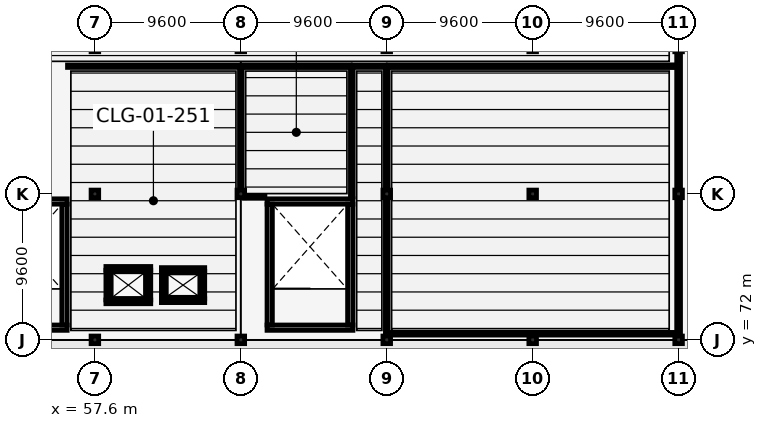
"""IFC4 building model, lengths in metres.
Left out: names, types, materials, properties, quantities, classifications, styles, units other than length and angle.
Written with IfcOpenShell. Run it as: python <this file> out.ifc"""

import sys

from ifc_helpers import new_model, si_unit, direction, frame, frame_2d, origin, origin_2d, place, context, subcontext, project, spatial, rectangle, extrude, element, fill, save


model = new_model("IFC4")
c1 = context("Model", 3, precision=1e-05, world=origin(), true_north=direction((0.0, 1.0)))
c2 = subcontext(c1, "Body", "Model", "MODEL_VIEW")
j1 = project(units=[si_unit("LENGTHUNIT", "METRE"), si_unit("PLANEANGLEUNIT", "RADIAN")], contexts=[c1])
p1 = place(None, origin())
s1 = spatial("IfcSite", under=j1, at=p1, CompositionType="ELEMENT")
p2 = place(p1, origin())
s2 = spatial("IfcBuilding", under=s1, at=p2, CompositionType="ELEMENT")
p3 = place(p2, frame((0.0, 0.0, 14.1)))
s3 = spatial("IfcBuildingStorey", under=s2, at=p3, CompositionType="ELEMENT", Elevation=14.1)
p4 = place(p3, frame((57.6, 72.0, 0.0), z_axis=(0.0, 0.0, 1.0), x_axis=(1.0, 0.0, 0.0)))
e1 = element("IfcColumn", 1, at=p4, inside=s3, PredefinedType="COLUMN", context=c2, shape_type="SweptSolid", body=[
    extrude(rectangle(XDim=0.5, YDim=0.5, at=origin_2d()), origin(), (0.0, 0.0, 1.0), 3.705),
])
p5 = place(p3, frame((57.6, 81.6, 0.0), z_axis=(0.0, 0.0, 1.0), x_axis=(1.0, 0.0, 0.0)))
e2 = element("IfcColumn", 2, at=p5, inside=s3, PredefinedType="COLUMN", context=c2, shape_type="SweptSolid", body=[
    extrude(rectangle(XDim=0.5, YDim=0.5, at=origin_2d()), origin(), (0.0, 0.0, 1.0), 4.485),
])
p6 = place(p3, frame((67.2, 72.0, 0.0), z_axis=(0.0, 0.0, 1.0), x_axis=(1.0, 0.0, 0.0)))
e3 = element("IfcColumn", 3, at=p6, inside=s3, PredefinedType="COLUMN", context=c2, shape_type="SweptSolid", body=[
    extrude(rectangle(XDim=0.5, YDim=0.5, at=origin_2d()), origin(), (0.0, 0.0, 1.0), 3.861),
])
p7 = place(p3, frame((67.2, 81.6, 0.0), z_axis=(0.0, 0.0, 1.0), x_axis=(1.0, 0.0, 0.0)))
e4 = element("IfcColumn", 4, at=p7, inside=s3, PredefinedType="COLUMN", context=c2, shape_type="SweptSolid", body=[
    extrude(rectangle(XDim=0.5, YDim=0.5, at=origin_2d()), origin(), (0.0, 0.0, 1.0), 4.5),
])
p8 = place(p3, frame((76.8, 72.0, 0.0), z_axis=(0.0, 0.0, 1.0), x_axis=(1.0, 0.0, 0.0)))
e5 = element("IfcColumn", 5, at=p8, inside=s3, PredefinedType="COLUMN", context=c2, shape_type="SweptSolid", body=[
    extrude(rectangle(XDim=0.5, YDim=0.5, at=origin_2d()), origin(), (0.0, 0.0, 1.0), 3.851),
])
p9 = place(p3, frame((76.8, 81.6, 0.0), z_axis=(0.0, 0.0, 1.0), x_axis=(1.0, 0.0, 0.0)))
e6 = element("IfcColumn", 6, at=p9, inside=s3, PredefinedType="COLUMN", context=c2, shape_type="SweptSolid", body=[
    extrude(rectangle(XDim=0.5, YDim=0.5, at=origin_2d()), origin(), (0.0, 0.0, 1.0), 4.5),
])
p10 = place(p3, frame((86.4, 72.0, 0.0), z_axis=(0.0, 0.0, 1.0), x_axis=(1.0, 0.0, 0.0)))
e7 = element("IfcColumn", 7, at=p10, inside=s3, PredefinedType="COLUMN", context=c2, shape_type="SweptSolid", body=[
    extrude(rectangle(XDim=0.5, YDim=0.5, at=origin_2d()), origin(), (0.0, 0.0, 1.0), 3.675),
])
p11 = place(p3, frame((86.4, 81.6, 0.0), z_axis=(0.0, 0.0, 1.0), x_axis=(1.0, 0.0, 0.0)))
e8 = element("IfcColumn", 8, at=p11, inside=s3, PredefinedType="COLUMN", context=c2, shape_type="SweptSolid", body=[
    extrude(rectangle(XDim=0.5, YDim=0.5, at=origin_2d()), origin(), (0.0, 0.0, 1.0), 4.402),
])
p12 = place(p3, frame((96.0, 72.0, 0.0), z_axis=(0.0, 0.0, 1.0), x_axis=(1.0, 0.0, 0.0)))
e9 = element("IfcColumn", 9, at=p12, inside=s3, PredefinedType="COLUMN", context=c2, shape_type="SweptSolid", body=[
    extrude(rectangle(XDim=0.5, YDim=0.5, at=origin_2d()), origin(), (0.0, 0.0, 1.0), 3.385),
])
p13 = place(p3, frame((96.0, 81.6, 0.0), z_axis=(0.0, 0.0, 1.0), x_axis=(1.0, 0.0, 0.0)))
e10 = element("IfcColumn", 10, at=p13, inside=s3, PredefinedType="COLUMN", context=c2, shape_type="SweptSolid", body=[
    extrude(rectangle(XDim=0.5, YDim=0.5, at=origin_2d()), origin(), (0.0, 0.0, 1.0), 3.592),
])
p14 = place(p3, frame((96.0, 72.25, 0.0), z_axis=(0.0, 0.0, 1.0), x_axis=(0.0, 1.0, 0.0)))
e11 = element("IfcWall", 11, at=p14, inside=s3, PredefinedType="STANDARD", context=c2, shape_type="SweptSolid", body=[
    extrude(rectangle(XDim=9.1, YDim=0.25, at=frame_2d((4.55, 0.0))), origin(), (0.0, 0.0, 1.0), 2.526),
])
p15 = place(p14, frame((3.2, 0.0, 0.0)))
e12 = element("IfcOpeningElement", 12, at=p15, cuts=e11, PredefinedType="OPENING", context=c2, shape_type="SweptSolid", body=[
    extrude(rectangle(XDim=1.6, YDim=2.2, at=frame_2d((0.8, 1.1))), frame((0.0, 0.135, 0.0), z_axis=(0.0, -1.0, 0.0), x_axis=(1.0, 0.0, 0.0)), (0.0, 0.0, 1.0), 0.27),
])
p16 = place(p3, frame((96.0, 81.85, 0.0), z_axis=(0.0, 0.0, 1.0), x_axis=(0.0, 1.0, 0.0)))
e13 = element("IfcWall", 13, at=p16, inside=s3, PredefinedType="STANDARD", context=c2, shape_type="SweptSolid", body=[
    extrude(rectangle(XDim=9.1, YDim=0.25, at=frame_2d((4.55, 0.0))), origin(), (0.0, 0.0, 1.0), 2.733),
])
p17 = place(p16, frame((3.0, 0.0, 1.0)))
e14 = element("IfcOpeningElement", 14, at=p17, cuts=e13, PredefinedType="OPENING", context=c2, shape_type="SweptSolid", body=[
    extrude(rectangle(XDim=1.16, YDim=1.47, at=frame_2d((0.58, 0.735))), frame((0.0, 0.135, 0.0), z_axis=(0.0, -1.0, 0.0), x_axis=(1.0, 0.0, 0.0)), (0.0, 0.0, 1.0), 0.27),
])
for number, where, z_axis, x_axis in (
    (15, (55.775, 72.8, 0.0), (0.0, 0.0, 1.0), (-1.0, 0.0, 0.0)),
    (16, (50.125, 81.1, 0.0), (0.0, 0.0, 1.0), (1.0, 0.0, 0.0)),
):
    element("IfcWall", number, at=place(p3, frame(where, z_axis=z_axis, x_axis=x_axis)), inside=s3, PredefinedType="SHEAR", context=c2, shape_type="SweptSolid", body=[
        extrude(rectangle(XDim=5.65, YDim=0.35, at=frame_2d((2.825, 0.0))), origin(), (0.0, 0.0, 1.0), 3.65),
    ])
p18 = place(p3, frame((55.6, 80.925, 0.0), z_axis=(0.0, 0.0, 1.0), x_axis=(0.0, -1.0, 0.0)))
e17 = element("IfcWall", 17, at=p18, inside=s3, PredefinedType="SHEAR", context=c2, shape_type="SweptSolid", body=[
    extrude(rectangle(XDim=7.95, YDim=0.35, at=frame_2d((3.975, 0.0))), origin(), (0.0, 0.0, 1.0), 3.65),
])
p19 = place(p18, frame((5.68, 0.0, 0.0)))
e18 = element("IfcOpeningElement", 18, at=p19, cuts=e17, PredefinedType="OPENING", context=c2, shape_type="SweptSolid", body=[
    extrude(rectangle(XDim=2.05, YDim=2.15, at=frame_2d((1.025, 1.075))), frame((0.0, 0.185, 0.0), z_axis=(0.0, -1.0, 0.0), x_axis=(1.0, 0.0, 0.0)), (0.0, 0.0, 1.0), 0.37),
])
for number, where, z_axis, x_axis in (
    (19, (74.575, 72.8, 0.0), (0.0, 0.0, 1.0), (-1.0, 0.0, 0.0)),
    (20, (68.925, 81.1, 0.0), (0.0, 0.0, 1.0), (1.0, 0.0, 0.0)),
):
    element("IfcWall", number, at=place(p3, frame(where, z_axis=z_axis, x_axis=x_axis)), inside=s3, PredefinedType="SHEAR", context=c2, shape_type="SweptSolid", body=[
        extrude(rectangle(XDim=5.65, YDim=0.35, at=frame_2d((2.825, 0.0))), origin(), (0.0, 0.0, 1.0), 3.65),
    ])
p20 = place(p3, frame((69.1, 72.975, 0.0), z_axis=(0.0, 0.0, 1.0), x_axis=(0.0, 1.0, 0.0)))
e21 = element("IfcWall", 21, at=p20, inside=s3, PredefinedType="SHEAR", context=c2, shape_type="SweptSolid", body=[
    extrude(rectangle(XDim=7.95, YDim=0.35, at=frame_2d((3.975, 0.0))), origin(), (0.0, 0.0, 1.0), 3.65),
])
p21 = place(p3, frame((74.4, 80.925, 0.0), z_axis=(0.0, 0.0, 1.0), x_axis=(0.0, -1.0, 0.0)))
e22 = element("IfcWall", 22, at=p21, inside=s3, PredefinedType="SHEAR", context=c2, shape_type="SweptSolid", body=[
    extrude(rectangle(XDim=7.95, YDim=0.35, at=frame_2d((3.975, 0.0))), origin(), (0.0, 0.0, 1.0), 3.65),
])
p22 = place(p21, frame((5.68, 0.0, 0.0)))
e23 = element("IfcOpeningElement", 23, at=p22, cuts=e22, PredefinedType="OPENING", context=c2, shape_type="SweptSolid", body=[
    extrude(rectangle(XDim=2.05, YDim=2.15, at=frame_2d((1.025, 1.075))), frame((0.0, 0.185, 0.0), z_axis=(0.0, -1.0, 0.0), x_axis=(1.0, 0.0, 0.0)), (0.0, 0.0, 1.0), 0.37),
])
p23 = place(p3, frame((61.275, 74.5, 0.0), z_axis=(0.0, 0.0, 1.0), x_axis=(-1.0, 0.0, 0.0)))
e24 = element("IfcWall", 24, at=p23, inside=s3, PredefinedType="SOLIDWALL", context=c2, shape_type="SweptSolid", body=[
    extrude(rectangle(XDim=2.95, YDim=0.25, at=frame_2d((1.475, 0.0))), origin(), (0.0, 0.0, 1.0), 3.65),
])
p24 = place(p3, frame((58.325, 76.7, 0.0), z_axis=(0.0, 0.0, 1.0), x_axis=(1.0, 0.0, 0.0)))
e25 = element("IfcWall", 25, at=p24, inside=s3, PredefinedType="SOLIDWALL", context=c2, shape_type="SweptSolid", body=[
    extrude(rectangle(XDim=2.95, YDim=0.25, at=frame_2d((1.475, 0.0))), origin(), (0.0, 0.0, 1.0), 3.65),
])
p25 = place(p24, frame((0.925, 0.0, 0.0)))
e26 = element("IfcOpeningElement", 26, at=p25, cuts=e25, PredefinedType="OPENING", context=c2, shape_type="SweptSolid", body=[
    extrude(rectangle(XDim=1.1, YDim=2.15, at=frame_2d((0.55, 1.075))), frame((0.0, 0.135, 0.0), z_axis=(0.0, -1.0, 0.0), x_axis=(1.0, 0.0, 0.0)), (0.0, 0.0, 1.0), 0.27),
])
for number, where, z_axis, x_axis in (
    (27, (58.45, 74.625, 0.0), (0.0, 0.0, 1.0), (0.0, 1.0, 0.0)),
    (28, (61.15, 76.575, 0.0), (0.0, 0.0, 1.0), (0.0, -1.0, 0.0)),
):
    element("IfcWall", number, at=place(p3, frame(where, z_axis=z_axis, x_axis=x_axis)), inside=s3, PredefinedType="SOLIDWALL", context=c2, shape_type="SweptSolid", body=[
        extrude(rectangle(XDim=1.95, YDim=0.25, at=frame_2d((0.975, 0.0))), origin(), (0.0, 0.0, 1.0), 3.65),
    ])
p26 = place(p3, frame((64.825, 74.575, 0.0), z_axis=(0.0, 0.0, 1.0), x_axis=(-1.0, 0.0, 0.0)))
e29 = element("IfcWall", 29, at=p26, inside=s3, PredefinedType="SOLIDWALL", context=c2, shape_type="SweptSolid", body=[
    extrude(rectangle(XDim=2.85, YDim=0.25, at=frame_2d((1.425, 0.0))), origin(), (0.0, 0.0, 1.0), 3.65),
])
p27 = place(p3, frame((61.975, 76.625, 0.0), z_axis=(0.0, 0.0, 1.0), x_axis=(1.0, 0.0, 0.0)))
e30 = element("IfcWall", 30, at=p27, inside=s3, PredefinedType="SOLIDWALL", context=c2, shape_type="SweptSolid", body=[
    extrude(rectangle(XDim=2.85, YDim=0.25, at=frame_2d((1.425, 0.0))), origin(), (0.0, 0.0, 1.0), 3.65),
])
p28 = place(p27, frame((0.875, 0.0, 0.0)))
e31 = element("IfcOpeningElement", 31, at=p28, cuts=e30, PredefinedType="OPENING", context=c2, shape_type="SweptSolid", body=[
    extrude(rectangle(XDim=1.1, YDim=2.15, at=frame_2d((0.55, 1.075))), frame((0.0, 0.135, 0.0), z_axis=(0.0, -1.0, 0.0), x_axis=(1.0, 0.0, 0.0)), (0.0, 0.0, 1.0), 0.27),
])
for number, where, z_axis, x_axis in (
    (32, (62.1, 74.7, 0.0), (0.0, 0.0, 1.0), (0.0, 1.0, 0.0)),
    (33, (64.7, 76.5, 0.0), (0.0, 0.0, 1.0), (0.0, -1.0, 0.0)),
):
    element("IfcWall", number, at=place(p3, frame(where, z_axis=z_axis, x_axis=x_axis)), inside=s3, PredefinedType="SOLIDWALL", context=c2, shape_type="SweptSolid", body=[
        extrude(rectangle(XDim=1.8, YDim=0.25, at=frame_2d((0.9, 0.0))), origin(), (0.0, 0.0, 1.0), 3.65),
    ])
p29 = place(p3, frame((67.2, 81.4, 0.0), z_axis=(0.0, 0.0, 1.0), x_axis=(0.0, 1.0, 0.0)))
e34 = element("IfcWall", 34, at=p29, inside=s3, PredefinedType="PARTITIONING", context=c2, shape_type="SweptSolid", body=[
    extrude(rectangle(XDim=8.5, YDim=0.175, at=frame_2d((4.25, 0.0))), origin(), (0.0, 0.0, 1.0), 3.1),
])
p30 = place(p29, frame((3.71, 0.0, 0.0)))
e35 = element("IfcOpeningElement", 35, at=p30, cuts=e34, PredefinedType="OPENING", context=c2, shape_type="SweptSolid", body=[
    extrude(rectangle(XDim=1.08, YDim=2.18, at=frame_2d((0.54, 1.09))), frame((0.0, 0.097, 0.0), z_axis=(0.0, -1.0, 0.0), x_axis=(1.0, 0.0, 0.0)), (0.0, 0.0, 1.0), 0.195),
])
p31 = place(p3, frame((55.8, 90.0, 0.0), z_axis=(0.0, 0.0, 1.0), x_axis=(1.0, 0.0, 0.0)))
e36 = element("IfcWall", 36, at=p31, inside=s3, PredefinedType="PARTITIONING", context=c2, shape_type="SweptSolid", body=[
    extrude(rectangle(XDim=11.3, YDim=0.16, at=frame_2d((5.65, 0.0))), origin(), (0.0, 0.0, 1.0), 3.1),
])
p32 = place(p31, frame((4.75, 0.0, 0.0)))
e37 = element("IfcOpeningElement", 37, at=p32, cuts=e36, PredefinedType="OPENING", context=c2, shape_type="SweptSolid", body=[
    extrude(rectangle(XDim=1.8, YDim=2.15, at=frame_2d((0.9, 1.075))), frame((0.0, 0.09, 0.0), z_axis=(0.0, -1.0, 0.0), x_axis=(1.0, 0.0, 0.0)), (0.0, 0.0, 1.0), 0.18),
])
p33 = place(p3, frame((74.5, 81.4, 0.0), z_axis=(0.0, 0.0, 1.0), x_axis=(0.0, 1.0, 0.0)))
e38 = element("IfcWall", 38, at=p33, inside=s3, PredefinedType="PARTITIONING", context=c2, shape_type="SweptSolid", body=[
    extrude(rectangle(XDim=8.5, YDim=0.175, at=frame_2d((4.25, 0.0))), origin(), (0.0, 0.0, 1.0), 3.1),
])
p34 = place(p33, frame((3.71, 0.0, 0.0)))
e39 = element("IfcOpeningElement", 39, at=p34, cuts=e38, PredefinedType="OPENING", context=c2, shape_type="SweptSolid", body=[
    extrude(rectangle(XDim=1.08, YDim=2.18, at=frame_2d((0.54, 1.09))), frame((0.0, 0.097, 0.0), z_axis=(0.0, -1.0, 0.0), x_axis=(1.0, 0.0, 0.0)), (0.0, 0.0, 1.0), 0.195),
])
p35 = place(p3, frame((76.8, 72.05, 0.0), z_axis=(0.0, 0.0, 1.0), x_axis=(0.0, 1.0, 0.0)))
e40 = element("IfcWall", 40, at=p35, inside=s3, PredefinedType="PARTITIONING", context=c2, shape_type="SweptSolid", body=[
    extrude(rectangle(XDim=17.85, YDim=0.175, at=frame_2d((8.925, 0.0))), origin(), (0.0, 0.0, 1.0), 2.992),
])
p36 = place(p35, frame((6.812, 0.0, 0.0)))
e41 = element("IfcOpeningElement", 41, at=p36, cuts=e40, PredefinedType="OPENING", context=c2, shape_type="SweptSolid", body=[
    extrude(rectangle(XDim=1.0, YDim=2.15, at=frame_2d((0.5, 1.075))), frame((0.0, 0.097, 0.0), z_axis=(0.0, -1.0, 0.0), x_axis=(1.0, 0.0, 0.0)), (0.0, 0.0, 1.0), 0.195),
])
p37 = place(p3, frame((74.6, 90.0, 0.0), z_axis=(0.0, 0.0, 1.0), x_axis=(1.0, 0.0, 0.0)))
e42 = element("IfcWall", 42, at=p37, inside=s3, PredefinedType="PARTITIONING", context=c2, shape_type="SweptSolid", body=[
    extrude(rectangle(XDim=2.1, YDim=0.16, at=frame_2d((1.05, 0.0))), origin(), (0.0, 0.0, 1.0), 3.1),
])
p38 = place(p37, frame((0.36, 0.0, 0.0)))
e43 = element("IfcOpeningElement", 43, at=p38, cuts=e42, PredefinedType="OPENING", context=c2, shape_type="SweptSolid", body=[
    extrude(rectangle(XDim=1.0, YDim=2.15, at=frame_2d((0.5, 1.075))), frame((0.0, 0.09, 0.0), z_axis=(0.0, -1.0, 0.0), x_axis=(1.0, 0.0, 0.0)), (0.0, 0.0, 1.0), 0.18),
])
p39 = place(p3, frame((67.3, 90.0, 0.0), z_axis=(0.0, 0.0, 1.0), x_axis=(1.0, 0.0, 0.0)))
e44 = element("IfcWall", 44, at=p39, inside=s3, PredefinedType="PARTITIONING", context=c2, shape_type="SweptSolid", body=[
    extrude(rectangle(XDim=7.1, YDim=0.175, at=frame_2d((3.55, 0.0))), origin(), (0.0, 0.0, 1.0), 3.1),
])
p40 = place(p39, frame((3.01, 0.0, 0.0)))
e45 = element("IfcOpeningElement", 45, at=p40, cuts=e44, PredefinedType="OPENING", context=c2, shape_type="SweptSolid", body=[
    extrude(rectangle(XDim=1.08, YDim=2.18, at=frame_2d((0.54, 1.09))), frame((0.0, 0.097, 0.0), z_axis=(0.0, -1.0, 0.0), x_axis=(1.0, 0.0, 0.0)), (0.0, 0.0, 1.0), 0.195),
])
p41 = place(p3, frame((76.9, 90.0, 0.0), z_axis=(0.0, 0.0, 1.0), x_axis=(1.0, 0.0, 0.0)))
e46 = element("IfcWall", 46, at=p41, inside=s3, PredefinedType="PARTITIONING", context=c2, shape_type="SweptSolid", body=[
    extrude(rectangle(XDim=19.05, YDim=0.175, at=frame_2d((9.525, 0.0))), origin(), (0.0, 0.0, 1.0), 3.1),
])
p42 = place(p41, frame((7.292, 0.0, 0.0)))
e47 = element("IfcOpeningElement", 47, at=p42, cuts=e46, PredefinedType="OPENING", context=c2, shape_type="SweptSolid", body=[
    extrude(rectangle(XDim=1.0, YDim=2.15, at=frame_2d((0.5, 1.075))), frame((0.0, 0.097, 0.0), z_axis=(0.0, -1.0, 0.0), x_axis=(1.0, 0.0, 0.0)), (0.0, 0.0, 1.0), 0.195),
])
p43 = place(p3, frame((67.44, 81.4, 0.0), z_axis=(0.0, 0.0, 1.0), x_axis=(1.0, 0.0, 0.0)))
e48 = element("IfcWall", 48, at=p43, inside=s3, PredefinedType="PARTITIONING", context=c2, shape_type="SweptSolid", body=[
    extrude(rectangle(XDim=1.345, YDim=0.175, at=frame_2d((0.672, 0.0))), origin(), (0.0, 0.0, 1.0), 3.1),
])
p44 = place(p3, frame((77.04, 72.4, 0.0), z_axis=(0.0, 0.0, 1.0), x_axis=(1.0, 0.0, 0.0)))
e49 = element("IfcWall", 49, at=p44, inside=s3, PredefinedType="PARTITIONING", context=c2, shape_type="SweptSolid", body=[
    extrude(rectangle(XDim=18.91, YDim=0.175, at=frame_2d((9.455, 0.0))), origin(), (0.0, 0.0, 1.0), 3.1),
])
p45 = place(p15, origin())
e50 = element("IfcDoor", 50, at=p45, inside=s3, OperationType="DOUBLE_DOOR_SINGLE_SWING", PredefinedType="DOOR", context=c2, shape_type="SweptSolid", body=[
    extrude(rectangle(XDim=1.6, YDim=2.2, at=frame_2d((0.8, 1.1))), frame((0.0, 0.025, 0.0), z_axis=(0.0, -1.0, 0.0), x_axis=(1.0, 0.0, 0.0)), (0.0, 0.0, 1.0), 0.05),
])
fill(e12, e50)
p46 = place(p17, origin())
e51 = element("IfcWindow", 51, at=p46, inside=s3, PartitioningType="SINGLE_PANEL", PredefinedType="WINDOW", context=c2, shape_type="SweptSolid", body=[
    extrude(rectangle(XDim=1.16, YDim=1.47, at=frame_2d((0.58, 0.735))), frame((0.0, 0.03, 0.0), z_axis=(0.0, -1.0, 0.0), x_axis=(1.0, 0.0, 0.0)), (0.0, 0.0, 1.0), 0.06),
])
fill(e14, e51)
p47 = place(p19, origin())
e52 = element("IfcDoor", 52, at=p47, inside=s3, OperationType="DOUBLE_DOOR_SINGLE_SWING", PredefinedType="DOOR", context=c2, shape_type="SweptSolid", body=[
    extrude(rectangle(XDim=2.05, YDim=2.15, at=frame_2d((1.025, 1.075))), frame((0.0, 0.025, 0.0), z_axis=(0.0, -1.0, 0.0), x_axis=(1.0, 0.0, 0.0)), (0.0, 0.0, 1.0), 0.05),
])
fill(e18, e52)
p48 = place(p22, origin())
e53 = element("IfcDoor", 53, at=p48, inside=s3, OperationType="DOUBLE_DOOR_SINGLE_SWING", PredefinedType="DOOR", context=c2, shape_type="SweptSolid", body=[
    extrude(rectangle(XDim=2.05, YDim=2.15, at=frame_2d((1.025, 1.075))), frame((0.0, 0.025, 0.0), z_axis=(0.0, -1.0, 0.0), x_axis=(1.0, 0.0, 0.0)), (0.0, 0.0, 1.0), 0.05),
])
fill(e23, e53)
p49 = place(p25, origin())
e54 = element("IfcDoor", 54, at=p49, inside=s3, OperationType="DOUBLE_DOOR_SLIDING", PredefinedType="DOOR", context=c2, shape_type="SweptSolid", body=[
    extrude(rectangle(XDim=1.1, YDim=2.15, at=frame_2d((0.55, 1.075))), frame((0.0, 0.025, 0.0), z_axis=(0.0, -1.0, 0.0), x_axis=(1.0, 0.0, 0.0)), (0.0, 0.0, 1.0), 0.05),
])
fill(e26, e54)
p50 = place(p28, origin())
e55 = element("IfcDoor", 55, at=p50, inside=s3, OperationType="DOUBLE_DOOR_SLIDING", PredefinedType="DOOR", context=c2, shape_type="SweptSolid", body=[
    extrude(rectangle(XDim=1.1, YDim=2.15, at=frame_2d((0.55, 1.075))), frame((0.0, 0.025, 0.0), z_axis=(0.0, -1.0, 0.0), x_axis=(1.0, 0.0, 0.0)), (0.0, 0.0, 1.0), 0.05),
])
fill(e31, e55)
p51 = place(p30, origin())
e56 = element("IfcDoor", 56, at=p51, inside=s3, OperationType="SINGLE_SWING_RIGHT", PredefinedType="DOOR", context=c2, shape_type="SweptSolid", body=[
    extrude(rectangle(XDim=1.08, YDim=2.18, at=frame_2d((0.54, 1.09))), frame((0.0, 0.025, 0.0), z_axis=(0.0, -1.0, 0.0), x_axis=(1.0, 0.0, 0.0)), (0.0, 0.0, 1.0), 0.05),
])
fill(e35, e56)
p52 = place(p32, origin())
e57 = element("IfcDoor", 57, at=p52, inside=s3, OperationType="DOUBLE_DOOR_SINGLE_SWING", PredefinedType="DOOR", context=c2, shape_type="SweptSolid", body=[
    extrude(rectangle(XDim=1.8, YDim=2.15, at=frame_2d((0.9, 1.075))), frame((0.0, 0.025, 0.0), z_axis=(0.0, -1.0, 0.0), x_axis=(1.0, 0.0, 0.0)), (0.0, 0.0, 1.0), 0.05),
])
fill(e37, e57)
p53 = place(p34, origin())
e58 = element("IfcDoor", 58, at=p53, inside=s3, OperationType="SINGLE_SWING_RIGHT", PredefinedType="DOOR", context=c2, shape_type="SweptSolid", body=[
    extrude(rectangle(XDim=1.08, YDim=2.18, at=frame_2d((0.54, 1.09))), frame((0.0, 0.025, 0.0), z_axis=(0.0, -1.0, 0.0), x_axis=(1.0, 0.0, 0.0)), (0.0, 0.0, 1.0), 0.05),
])
fill(e39, e58)
p54 = place(p36, origin())
e59 = element("IfcDoor", 59, at=p54, inside=s3, OperationType="SINGLE_SWING_LEFT", PredefinedType="DOOR", context=c2, shape_type="SweptSolid", body=[
    extrude(rectangle(XDim=1.0, YDim=2.15, at=frame_2d((0.5, 1.075))), frame((0.0, 0.025, 0.0), z_axis=(0.0, -1.0, 0.0), x_axis=(1.0, 0.0, 0.0)), (0.0, 0.0, 1.0), 0.05),
])
fill(e41, e59)
p55 = place(p38, origin())
e60 = element("IfcDoor", 60, at=p55, inside=s3, OperationType="SINGLE_SWING_RIGHT", PredefinedType="DOOR", context=c2, shape_type="SweptSolid", body=[
    extrude(rectangle(XDim=1.0, YDim=2.15, at=frame_2d((0.5, 1.075))), frame((0.0, 0.025, 0.0), z_axis=(0.0, -1.0, 0.0), x_axis=(1.0, 0.0, 0.0)), (0.0, 0.0, 1.0), 0.05),
])
fill(e43, e60)
p56 = place(p40, origin())
e61 = element("IfcDoor", 61, at=p56, inside=s3, OperationType="SINGLE_SWING_LEFT", PredefinedType="DOOR", context=c2, shape_type="SweptSolid", body=[
    extrude(rectangle(XDim=1.08, YDim=2.18, at=frame_2d((0.54, 1.09))), frame((0.0, 0.025, 0.0), z_axis=(0.0, -1.0, 0.0), x_axis=(1.0, 0.0, 0.0)), (0.0, 0.0, 1.0), 0.05),
])
fill(e45, e61)
p57 = place(p42, origin())
e62 = element("IfcDoor", 62, at=p57, inside=s3, OperationType="SINGLE_SWING_RIGHT", PredefinedType="DOOR", context=c2, shape_type="SweptSolid", body=[
    extrude(rectangle(XDim=1.0, YDim=2.15, at=frame_2d((0.5, 1.075))), frame((0.0, 0.025, 0.0), z_axis=(0.0, -1.0, 0.0), x_axis=(1.0, 0.0, 0.0)), (0.0, 0.0, 1.0), 0.05),
])
fill(e47, e62)
save(model, sys.argv[1])
